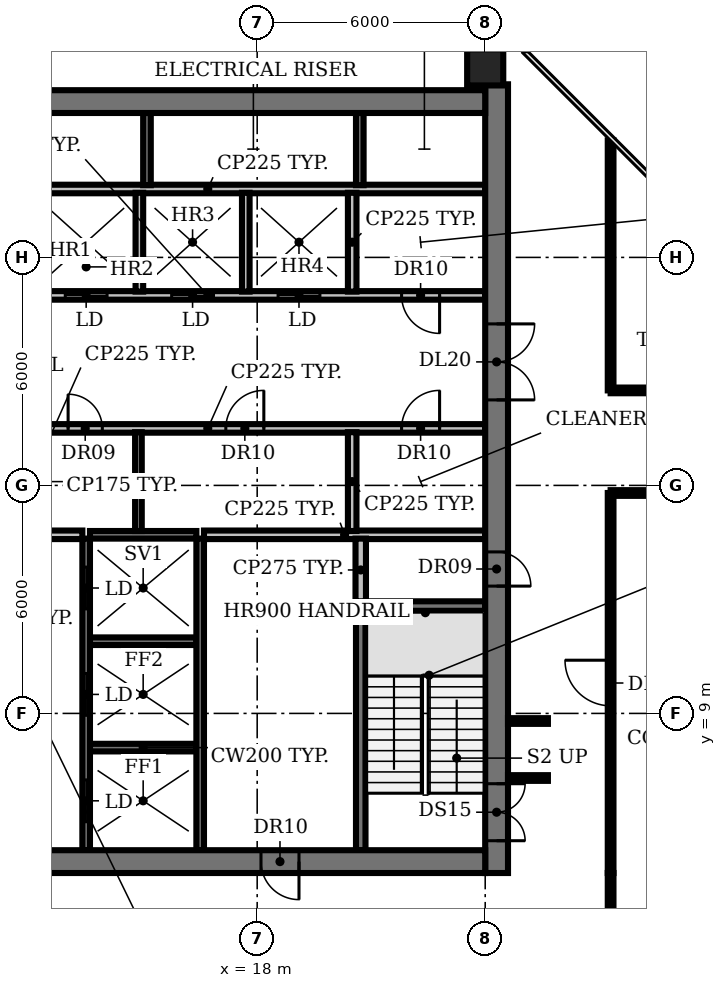
"""IFC4 building model, lengths in metres.
Left out: names, types, materials, properties, quantities, classifications, styles, units other than length and angle.
Written with IfcOpenShell. Run it as: python <this file> out.ifc"""

import sys

from ifc_helpers import new_model, si_unit, direction, frame, frame_2d, origin, origin_2d, place, context, subcontext, project, spatial, rectangle, circle, extrude, element, fill, save


model = new_model("IFC4")
c1 = context("Model", 3, precision=1e-05, world=origin(), true_north=direction((0.0, 1.0)))
c2 = subcontext(c1, "Body", "Model", "MODEL_VIEW")
j1 = project(units=[si_unit("LENGTHUNIT", "METRE"), si_unit("PLANEANGLEUNIT", "RADIAN")], contexts=[c1])
p1 = place(None, origin())
s1 = spatial("IfcSite", under=j1, at=p1, CompositionType="ELEMENT")
p2 = place(p1, origin())
s2 = spatial("IfcBuilding", under=s1, at=p2, CompositionType="ELEMENT")
p3 = place(p2, frame((0.0, 0.0, 155.0)))
s3 = spatial("IfcBuildingStorey", under=s2, at=p3, CompositionType="ELEMENT", Elevation=155.0)
p4 = place(p3, frame((24.0, 26.0, 0.0), z_axis=(0.0, 0.0, 1.0), x_axis=(1.0, 0.0, 0.0)))
e1 = element("IfcColumn", 1, at=p4, inside=s3, PredefinedType="COLUMN", context=c2, shape_type="SweptSolid", body=[
    extrude(circle(Radius=0.475, at=origin_2d()), origin(), (0.0, 0.0, 1.0), 3.85),
])
for number, where, z_axis, x_axis in (
    (2, (13.6, 8.1, 0.0), (0.0, 0.0, 1.0), (1.0, 0.0, 0.0)),
    (3, (13.6, 10.9, 0.0), (0.0, 0.0, 1.0), (1.0, 0.0, 0.0)),
):
    element("IfcWall", number, at=place(p3, frame(where, z_axis=z_axis, x_axis=x_axis)), inside=s3, PredefinedType="SHEAR", context=c2, shape_type="SweptSolid", body=[
        extrude(rectangle(XDim=2.8, YDim=0.2, at=frame_2d((1.4, 0.0))), origin(), (0.0, 0.0, 1.0), 3.85),
    ])
p5 = place(p3, frame((20.85, 11.825, 0.0), z_axis=(0.0, 0.0, 1.0), x_axis=(1.0, 0.0, 0.0)))
e4 = element("IfcWall", 4, at=p5, inside=s3, PredefinedType="SHEAR", context=c2, shape_type="SweptSolid", body=[
    extrude(rectangle(XDim=3.15, YDim=0.25, at=frame_2d((1.575, 0.0))), origin(), (0.0, 0.0, 1.0), 3.85),
])
p6 = place(p3, frame((9.4, 13.7, 0.0), z_axis=(0.0, 0.0, 1.0), x_axis=(1.0, 0.0, 0.0)))
e5 = element("IfcWall", 5, at=p6, inside=s3, PredefinedType="PARTITIONING", context=c2, shape_type="SweptSolid", body=[
    extrude(rectangle(XDim=4.0, YDim=0.225, at=frame_2d((2.0, 0.0))), origin(), (0.0, 0.0, 1.0), 3.85),
])
p7 = place(p3, frame((13.6, 13.7, 0.0), z_axis=(0.0, 0.0, 1.0), x_axis=(1.0, 0.0, 0.0)))
e6 = element("IfcWall", 6, at=p7, inside=s3, PredefinedType="SHEAR", context=c2, shape_type="SweptSolid", body=[
    extrude(rectangle(XDim=2.8, YDim=0.2, at=frame_2d((1.4, 0.0))), origin(), (0.0, 0.0, 1.0), 3.85),
])
p8 = place(p3, frame((16.6, 13.7, 0.0), z_axis=(0.0, 0.0, 1.0), x_axis=(1.0, 0.0, 0.0)))
e7 = element("IfcWall", 7, at=p8, inside=s3, PredefinedType="PARTITIONING", context=c2, shape_type="SweptSolid", body=[
    extrude(rectangle(XDim=7.4, YDim=0.225, at=frame_2d((3.7, 0.0))), origin(), (0.0, 0.0, 1.0), 3.85),
])
p9 = place(p3, frame((9.4, 16.5, 0.0), z_axis=(0.0, 0.0, 1.0), x_axis=(1.0, 0.0, 0.0)))
e8 = element("IfcWall", 8, at=p9, inside=s3, PredefinedType="PARTITIONING", context=c2, shape_type="SweptSolid", body=[
    extrude(rectangle(XDim=14.6, YDim=0.225, at=frame_2d((7.3, 0.0))), origin(), (0.0, 0.0, 1.0), 3.85),
])
p10 = place(p9, frame((0.85, 0.0, 0.0)))
e9 = element("IfcOpeningElement", 9, at=p10, cuts=e8, PredefinedType="OPENING", context=c2, shape_type="SweptSolid", body=[
    extrude(rectangle(XDim=0.9, YDim=2.1, at=frame_2d((0.45, 1.05))), frame((0.0, 0.123, 0.0), z_axis=(0.0, -1.0, 0.0), x_axis=(1.0, 0.0, 0.0)), (0.0, 0.0, 1.0), 0.245),
])
p11 = place(p9, frame((3.625, 0.0, 0.0)))
e10 = element("IfcOpeningElement", 10, at=p11, cuts=e8, PredefinedType="OPENING", context=c2, shape_type="SweptSolid", body=[
    extrude(rectangle(XDim=0.9, YDim=2.1, at=frame_2d((0.45, 1.05))), frame((0.0, 0.123, 0.0), z_axis=(0.0, -1.0, 0.0), x_axis=(1.0, 0.0, 0.0)), (0.0, 0.0, 1.0), 0.245),
])
p12 = place(p9, frame((7.775, 0.0, 0.0)))
e11 = element("IfcOpeningElement", 11, at=p12, cuts=e8, PredefinedType="OPENING", context=c2, shape_type="SweptSolid", body=[
    extrude(rectangle(XDim=1.0, YDim=2.1, at=frame_2d((0.5, 1.05))), frame((0.0, 0.123, 0.0), z_axis=(0.0, -1.0, 0.0), x_axis=(1.0, 0.0, 0.0)), (0.0, 0.0, 1.0), 0.245),
])
p13 = place(p9, frame((12.4, 0.0, 0.0)))
e12 = element("IfcOpeningElement", 12, at=p13, cuts=e8, PredefinedType="OPENING", context=c2, shape_type="SweptSolid", body=[
    extrude(rectangle(XDim=1.0, YDim=2.1, at=frame_2d((0.5, 1.05))), frame((0.0, 0.123, 0.0), z_axis=(0.0, -1.0, 0.0), x_axis=(1.0, 0.0, 0.0)), (0.0, 0.0, 1.0), 0.245),
])
p14 = place(p3, frame((24.0, 20.0, 0.0), z_axis=(0.0, 0.0, 1.0), x_axis=(-1.0, 0.0, 0.0)))
e13 = element("IfcWall", 13, at=p14, inside=s3, PredefinedType="PARTITIONING", context=c2, shape_type="SweptSolid", body=[
    extrude(rectangle(XDim=14.6, YDim=0.225, at=frame_2d((7.3, 0.0))), origin(), (0.0, 0.0, 1.0), 3.85),
])
p15 = place(p14, frame((12.75, 0.0, 0.0)))
e14 = element("IfcOpeningElement", 14, at=p15, cuts=e13, PredefinedType="OPENING", context=c2, shape_type="SweptSolid", body=[
    extrude(rectangle(XDim=1.1, YDim=2.1, at=frame_2d((0.55, 1.05))), frame((0.0, 0.123, 0.0), z_axis=(0.0, -1.0, 0.0), x_axis=(1.0, 0.0, 0.0)), (0.0, 0.0, 1.0), 0.245),
])
p16 = place(p14, frame((9.95, 0.0, 0.0)))
e15 = element("IfcOpeningElement", 15, at=p16, cuts=e13, PredefinedType="OPENING", context=c2, shape_type="SweptSolid", body=[
    extrude(rectangle(XDim=1.1, YDim=2.1, at=frame_2d((0.55, 1.05))), frame((0.0, 0.123, 0.0), z_axis=(0.0, -1.0, 0.0), x_axis=(1.0, 0.0, 0.0)), (0.0, 0.0, 1.0), 0.245),
])
p17 = place(p14, frame((7.15, 0.0, 0.0)))
e16 = element("IfcOpeningElement", 16, at=p17, cuts=e13, PredefinedType="OPENING", context=c2, shape_type="SweptSolid", body=[
    extrude(rectangle(XDim=1.1, YDim=2.1, at=frame_2d((0.55, 1.05))), frame((0.0, 0.123, 0.0), z_axis=(0.0, -1.0, 0.0), x_axis=(1.0, 0.0, 0.0)), (0.0, 0.0, 1.0), 0.245),
])
p18 = place(p14, frame((4.35, 0.0, 0.0)))
e17 = element("IfcOpeningElement", 17, at=p18, cuts=e13, PredefinedType="OPENING", context=c2, shape_type="SweptSolid", body=[
    extrude(rectangle(XDim=1.1, YDim=2.1, at=frame_2d((0.55, 1.05))), frame((0.0, 0.123, 0.0), z_axis=(0.0, -1.0, 0.0), x_axis=(1.0, 0.0, 0.0)), (0.0, 0.0, 1.0), 0.245),
])
p19 = place(p14, frame((1.2, 0.0, 0.0)))
e18 = element("IfcOpeningElement", 18, at=p19, cuts=e13, PredefinedType="OPENING", context=c2, shape_type="SweptSolid", body=[
    extrude(rectangle(XDim=1.0, YDim=2.1, at=frame_2d((0.5, 1.05))), frame((0.0, 0.123, 0.0), z_axis=(0.0, -1.0, 0.0), x_axis=(1.0, 0.0, 0.0)), (0.0, 0.0, 1.0), 0.245),
])
p20 = place(p3, frame((9.4, 22.8, 0.0), z_axis=(0.0, 0.0, 1.0), x_axis=(1.0, 0.0, 0.0)))
e19 = element("IfcWall", 19, at=p20, inside=s3, PredefinedType="PARTITIONING", context=c2, shape_type="SweptSolid", body=[
    extrude(rectangle(XDim=14.6, YDim=0.225, at=frame_2d((7.3, 0.0))), origin(), (0.0, 0.0, 1.0), 3.85),
])
p21 = place(p3, frame((13.5, 5.4, 0.0), z_axis=(0.0, 0.0, 1.0), x_axis=(0.0, 1.0, 0.0)))
e20 = element("IfcWall", 20, at=p21, inside=s3, PredefinedType="SHEAR", context=c2, shape_type="SweptSolid", body=[
    extrude(rectangle(XDim=8.2, YDim=0.2, at=frame_2d((4.1, 0.0))), origin(), (0.0, 0.0, 1.0), 3.85),
])
p22 = place(p21, frame((0.75, 0.0, 0.0)))
e21 = element("IfcOpeningElement", 21, at=p22, cuts=e20, PredefinedType="OPENING", context=c2, shape_type="SweptSolid", body=[
    extrude(rectangle(XDim=1.1, YDim=2.1, at=frame_2d((0.55, 1.05))), frame((0.0, 0.11, 0.0), z_axis=(0.0, -1.0, 0.0), x_axis=(1.0, 0.0, 0.0)), (0.0, 0.0, 1.0), 0.22),
])
p23 = place(p21, frame((3.55, 0.0, 0.0)))
e22 = element("IfcOpeningElement", 22, at=p23, cuts=e20, PredefinedType="OPENING", context=c2, shape_type="SweptSolid", body=[
    extrude(rectangle(XDim=1.1, YDim=2.1, at=frame_2d((0.55, 1.05))), frame((0.0, 0.11, 0.0), z_axis=(0.0, -1.0, 0.0), x_axis=(1.0, 0.0, 0.0)), (0.0, 0.0, 1.0), 0.22),
])
p24 = place(p21, frame((6.35, 0.0, 0.0)))
e23 = element("IfcOpeningElement", 23, at=p24, cuts=e20, PredefinedType="OPENING", context=c2, shape_type="SweptSolid", body=[
    extrude(rectangle(XDim=1.1, YDim=2.1, at=frame_2d((0.55, 1.05))), frame((0.0, 0.11, 0.0), z_axis=(0.0, -1.0, 0.0), x_axis=(1.0, 0.0, 0.0)), (0.0, 0.0, 1.0), 0.22),
])
p25 = place(p3, frame((14.875, 13.8, 0.0), z_axis=(0.0, 0.0, 1.0), x_axis=(0.0, 1.0, 0.0)))
e24 = element("IfcWall", 24, at=p25, inside=s3, PredefinedType="PARTITIONING", context=c2, shape_type="SweptSolid", body=[
    extrude(rectangle(XDim=2.6, YDim=0.175, at=frame_2d((1.3, 0.0))), origin(), (0.0, 0.0, 1.0), 3.85),
])
p26 = place(p3, frame((14.9, 20.1, 0.0), z_axis=(0.0, 0.0, 1.0), x_axis=(0.0, 1.0, 0.0)))
e25 = element("IfcWall", 25, at=p26, inside=s3, PredefinedType="SOLIDWALL", context=c2, shape_type="SweptSolid", body=[
    extrude(rectangle(XDim=2.6, YDim=0.2, at=frame_2d((1.3, 0.0))), origin(), (0.0, 0.0, 1.0), 3.85),
])
p27 = place(p3, frame((15.1, 22.9, 0.0), z_axis=(0.0, 0.0, 1.0), x_axis=(0.0, 1.0, 0.0)))
e26 = element("IfcWall", 26, at=p27, inside=s3, PredefinedType="SHEAR", context=c2, shape_type="SweptSolid", body=[
    extrude(rectangle(XDim=1.9, YDim=0.2, at=frame_2d((0.95, 0.0))), origin(), (0.0, 0.0, 1.0), 3.85),
])
p28 = place(p3, frame((16.5, 5.4, 0.0), z_axis=(0.0, 0.0, 1.0), x_axis=(0.0, 1.0, 0.0)))
e27 = element("IfcWall", 27, at=p28, inside=s3, PredefinedType="SHEAR", context=c2, shape_type="SweptSolid", body=[
    extrude(rectangle(XDim=8.2, YDim=0.2, at=frame_2d((4.1, 0.0))), origin(), (0.0, 0.0, 1.0), 3.85),
])
p29 = place(p3, frame((17.7, 20.1, 0.0), z_axis=(0.0, 0.0, 1.0), x_axis=(0.0, 1.0, 0.0)))
e28 = element("IfcWall", 28, at=p29, inside=s3, PredefinedType="SOLIDWALL", context=c2, shape_type="SweptSolid", body=[
    extrude(rectangle(XDim=2.6, YDim=0.2, at=frame_2d((1.3, 0.0))), origin(), (0.0, 0.0, 1.0), 3.85),
])
for number, where, z_axis, x_axis in (
    (29, (20.5, 13.8, 0.0), (0.0, 0.0, 1.0), (0.0, 1.0, 0.0)),
    (30, (20.5, 20.1, 0.0), (0.0, 0.0, 1.0), (0.0, 1.0, 0.0)),
):
    element("IfcWall", number, at=place(p3, frame(where, z_axis=z_axis, x_axis=x_axis)), inside=s3, PredefinedType="PARTITIONING", context=c2, shape_type="SweptSolid", body=[
        extrude(rectangle(XDim=2.6, YDim=0.225, at=frame_2d((1.3, 0.0))), origin(), (0.0, 0.0, 1.0), 3.85),
    ])
p30 = place(p3, frame((20.7, 22.9, 0.0), z_axis=(0.0, 0.0, 1.0), x_axis=(0.0, 1.0, 0.0)))
e31 = element("IfcWall", 31, at=p30, inside=s3, PredefinedType="SHEAR", context=c2, shape_type="SweptSolid", body=[
    extrude(rectangle(XDim=1.9, YDim=0.2, at=frame_2d((0.95, 0.0))), origin(), (0.0, 0.0, 1.0), 3.85),
])
p31 = place(p3, frame((20.725, 5.4, 0.0), z_axis=(0.0, 0.0, 1.0), x_axis=(0.0, 1.0, 0.0)))
e32 = element("IfcWall", 32, at=p31, inside=s3, PredefinedType="SHEAR", context=c2, shape_type="SweptSolid", body=[
    extrude(rectangle(XDim=6.3, YDim=0.25, at=frame_2d((3.15, 0.0))), origin(), (0.0, 0.0, 1.0), 3.85),
])
p32 = place(p3, frame((20.725, 11.95, 0.0), z_axis=(0.0, 0.0, 1.0), x_axis=(0.0, 1.0, 0.0)))
e33 = element("IfcWall", 33, at=p32, inside=s3, PredefinedType="PARTITIONING", context=c2, shape_type="SweptSolid", body=[
    extrude(rectangle(XDim=1.65, YDim=0.275, at=frame_2d((0.825, 0.0))), origin(), (0.0, 0.0, 1.0), 3.85),
])
p33 = place(p3, frame((24.3, 25.555, 0.0), z_axis=(0.0, 0.0, 1.0), x_axis=(0.0, -1.0, 0.0)))
e34 = element("IfcWall", 34, at=p33, inside=s3, PredefinedType="SHEAR", context=c2, shape_type="SweptSolid", body=[
    extrude(rectangle(XDim=20.755, YDim=0.6, at=frame_2d((10.377, 0.0))), origin(), (0.0, 0.0, 1.0), 3.85),
])
p34 = place(p33, frame((18.405, 0.0, 0.0)))
e35 = element("IfcOpeningElement", 35, at=p34, cuts=e34, PredefinedType="OPENING", context=c2, shape_type="SweptSolid", body=[
    extrude(rectangle(XDim=1.5, YDim=2.1, at=frame_2d((0.75, 1.05))), frame((0.0, 0.31, 0.0), z_axis=(0.0, -1.0, 0.0), x_axis=(1.0, 0.0, 0.0)), (0.0, 0.0, 1.0), 0.62),
])
p35 = place(p33, frame((12.305, 0.0, 0.0)))
e36 = element("IfcOpeningElement", 36, at=p35, cuts=e34, PredefinedType="OPENING", context=c2, shape_type="SweptSolid", body=[
    extrude(rectangle(XDim=0.9, YDim=2.1, at=frame_2d((0.45, 1.05))), frame((0.0, 0.31, 0.0), z_axis=(0.0, -1.0, 0.0), x_axis=(1.0, 0.0, 0.0)), (0.0, 0.0, 1.0), 0.62),
])
p36 = place(p33, frame((6.305, 0.0, 0.0)))
e37 = element("IfcOpeningElement", 37, at=p36, cuts=e34, PredefinedType="OPENING", context=c2, shape_type="SweptSolid", body=[
    extrude(rectangle(XDim=2.0, YDim=2.1, at=frame_2d((1.0, 1.05))), frame((0.0, 0.31, 0.0), z_axis=(0.0, -1.0, 0.0), x_axis=(1.0, 0.0, 0.0)), (0.0, 0.0, 1.0), 0.62),
])
p37 = place(p3, frame((24.0, 5.1, 0.0), z_axis=(0.0, 0.0, 1.0), x_axis=(-1.0, 0.0, 0.0)))
e38 = element("IfcWall", 38, at=p37, inside=s3, PredefinedType="SHEAR", context=c2, shape_type="SweptSolid", body=[
    extrude(rectangle(XDim=18.0, YDim=0.6, at=frame_2d((9.0, 0.0))), origin(), (0.0, 0.0, 1.0), 3.85),
])
p38 = place(p37, frame((13.0, 0.0, 0.0)))
e39 = element("IfcOpeningElement", 39, at=p38, cuts=e38, PredefinedType="OPENING", context=c2, shape_type="SweptSolid", body=[
    extrude(rectangle(XDim=1.2, YDim=2.1, at=frame_2d((0.6, 1.05))), frame((0.0, 0.31, 0.0), z_axis=(0.0, -1.0, 0.0), x_axis=(1.0, 0.0, 0.0)), (0.0, 0.0, 1.0), 0.62),
])
p39 = place(p37, frame((4.9, 0.0, 0.0)))
e40 = element("IfcOpeningElement", 40, at=p39, cuts=e38, PredefinedType="OPENING", context=c2, shape_type="SweptSolid", body=[
    extrude(rectangle(XDim=1.0, YDim=2.1, at=frame_2d((0.5, 1.05))), frame((0.0, 0.31, 0.0), z_axis=(0.0, -1.0, 0.0), x_axis=(1.0, 0.0, 0.0)), (0.0, 0.0, 1.0), 0.62),
])
p40 = place(p3, frame((6.0, 25.1, 0.0), z_axis=(0.0, 0.0, 1.0), x_axis=(1.0, 0.0, 0.0)))
e41 = element("IfcWall", 41, at=p40, inside=s3, PredefinedType="SHEAR", context=c2, shape_type="SweptSolid", body=[
    extrude(rectangle(XDim=18.0, YDim=0.6, at=frame_2d((9.0, 0.0))), origin(), (0.0, 0.0, 1.0), 3.85),
])
for number, where, z_axis, x_axis in (
    (42, (24.6, 7.3, 0.0), (0.0, 0.0, 1.0), (1.0, 0.0, 0.0)),
    (43, (24.6, 8.8, 0.0), (0.0, 0.0, 1.0), (1.0, 0.0, 0.0)),
):
    element("IfcWall", number, at=place(p3, frame(where, z_axis=z_axis, x_axis=x_axis)), inside=s3, PredefinedType="PARTITIONING", context=c2, shape_type="SweptSolid", body=[
        extrude(rectangle(XDim=1.05, YDim=0.15, at=frame_2d((0.525, 0.0))), origin(), (0.0, 0.0, 1.0), 2.88),
    ])
p41 = place(p3, frame((27.3, 0.9, 0.0), z_axis=(0.0, 0.0, 1.0), x_axis=(0.0, 1.0, 0.0)))
e44 = element("IfcWall", 44, at=p41, inside=s3, PredefinedType="PARTITIONING", context=c2, shape_type="SweptSolid", body=[
    extrude(rectangle(XDim=3.9, YDim=0.15, at=frame_2d((1.95, 0.0))), origin(), (0.0, 0.0, 1.0), 2.88),
])
p42 = place(p3, frame((27.3, 4.8, 0.0), z_axis=(0.0, 0.0, 1.0), x_axis=(0.0, 1.0, 0.0)))
e45 = element("IfcWall", 45, at=p42, inside=s3, PredefinedType="PARTITIONING", context=c2, shape_type="SweptSolid", body=[
    extrude(rectangle(XDim=10.0, YDim=0.15, at=frame_2d((5.0, 0.0))), origin(), (0.0, 0.0, 1.0), 2.88),
])
p43 = place(p42, frame((4.4, 0.0, 0.0)))
e46 = element("IfcOpeningElement", 46, at=p43, cuts=e45, PredefinedType="OPENING", context=c2, shape_type="SweptSolid", body=[
    extrude(rectangle(XDim=1.2, YDim=2.1, at=frame_2d((0.6, 1.05))), frame((0.0, 0.085, 0.0), z_axis=(0.0, -1.0, 0.0), x_axis=(1.0, 0.0, 0.0)), (0.0, 0.0, 1.0), 0.17),
])
p44 = place(p3, frame((27.3, 14.8, 0.0), z_axis=(0.0, 0.0, 1.0), x_axis=(1.0, 0.0, 0.0)))
e47 = element("IfcWall", 47, at=p44, inside=s3, PredefinedType="PARTITIONING", context=c2, shape_type="SweptSolid", body=[
    extrude(rectangle(XDim=8.7, YDim=0.15, at=frame_2d((4.35, 0.0))), origin(), (0.0, 0.0, 1.0), 2.88),
])
p45 = place(p3, frame((27.3, 17.5, 0.0), z_axis=(0.0, 0.0, 1.0), x_axis=(0.0, 1.0, 0.0)))
e48 = element("IfcWall", 48, at=p45, inside=s3, PredefinedType="PARTITIONING", context=c2, shape_type="SweptSolid", body=[
    extrude(rectangle(XDim=6.58, YDim=0.15, at=frame_2d((3.29, 0.0))), origin(), (0.0, 0.0, 1.0), 2.88),
])
p46 = place(p3, frame((27.3, 17.5, 0.0), z_axis=(0.0, 0.0, 1.0), x_axis=(1.0, 0.0, 0.0)))
e49 = element("IfcWall", 49, at=p46, inside=s3, PredefinedType="PARTITIONING", context=c2, shape_type="SweptSolid", body=[
    extrude(rectangle(XDim=12.58, YDim=0.15, at=frame_2d((6.29, 0.0))), origin(), (0.0, 0.0, 1.0), 2.88),
])
p47 = place(p46, frame((5.68, 0.0, 0.0)))
e50 = element("IfcOpeningElement", 50, at=p47, cuts=e49, PredefinedType="OPENING", context=c2, shape_type="SweptSolid", body=[
    extrude(rectangle(XDim=1.0, YDim=2.1, at=frame_2d((0.5, 1.05))), frame((0.0, 0.085, 0.0), z_axis=(0.0, -1.0, 0.0), x_axis=(1.0, 0.0, 0.0)), (0.0, 0.0, 1.0), 0.17),
])
p48 = place(p11, origin())
e51 = element("IfcDoor", 51, at=p48, inside=s3, OperationType="SINGLE_SWING_LEFT", PredefinedType="DOOR", context=c2, shape_type="SweptSolid", body=[
    extrude(rectangle(XDim=0.9, YDim=2.1, at=frame_2d((0.45, 1.05))), frame((0.0, 0.025, 0.0), z_axis=(0.0, -1.0, 0.0), x_axis=(1.0, 0.0, 0.0)), (0.0, 0.0, 1.0), 0.05),
])
fill(e10, e51)
p49 = place(p12, origin())
e52 = element("IfcDoor", 52, at=p49, inside=s3, OperationType="SINGLE_SWING_RIGHT", PredefinedType="DOOR", context=c2, shape_type="SweptSolid", body=[
    extrude(rectangle(XDim=1.0, YDim=2.1, at=frame_2d((0.5, 1.05))), frame((0.0, 0.025, 0.0), z_axis=(0.0, -1.0, 0.0), x_axis=(1.0, 0.0, 0.0)), (0.0, 0.0, 1.0), 0.05),
])
fill(e11, e52)
p50 = place(p13, origin())
e53 = element("IfcDoor", 53, at=p50, inside=s3, OperationType="SINGLE_SWING_RIGHT", PredefinedType="DOOR", context=c2, shape_type="SweptSolid", body=[
    extrude(rectangle(XDim=1.0, YDim=2.1, at=frame_2d((0.5, 1.05))), frame((0.0, 0.025, 0.0), z_axis=(0.0, -1.0, 0.0), x_axis=(1.0, 0.0, 0.0)), (0.0, 0.0, 1.0), 0.05),
])
fill(e12, e53)
p51 = place(p16, origin())
e54 = element("IfcDoor", 54, at=p51, inside=s3, OperationType="DOUBLE_DOOR_SLIDING", PredefinedType="DOOR", context=c2, shape_type="SweptSolid", body=[
    extrude(rectangle(XDim=1.1, YDim=2.1, at=frame_2d((0.55, 1.05))), frame((0.0, 0.025, 0.0), z_axis=(0.0, -1.0, 0.0), x_axis=(1.0, 0.0, 0.0)), (0.0, 0.0, 1.0), 0.05),
])
fill(e15, e54)
p52 = place(p17, origin())
e55 = element("IfcDoor", 55, at=p52, inside=s3, OperationType="DOUBLE_DOOR_SLIDING", PredefinedType="DOOR", context=c2, shape_type="SweptSolid", body=[
    extrude(rectangle(XDim=1.1, YDim=2.1, at=frame_2d((0.55, 1.05))), frame((0.0, 0.025, 0.0), z_axis=(0.0, -1.0, 0.0), x_axis=(1.0, 0.0, 0.0)), (0.0, 0.0, 1.0), 0.05),
])
fill(e16, e55)
p53 = place(p18, origin())
e56 = element("IfcDoor", 56, at=p53, inside=s3, OperationType="DOUBLE_DOOR_SLIDING", PredefinedType="DOOR", context=c2, shape_type="SweptSolid", body=[
    extrude(rectangle(XDim=1.1, YDim=2.1, at=frame_2d((0.55, 1.05))), frame((0.0, 0.025, 0.0), z_axis=(0.0, -1.0, 0.0), x_axis=(1.0, 0.0, 0.0)), (0.0, 0.0, 1.0), 0.05),
])
fill(e17, e56)
p54 = place(p19, origin())
e57 = element("IfcDoor", 57, at=p54, inside=s3, OperationType="SINGLE_SWING_LEFT", PredefinedType="DOOR", context=c2, shape_type="SweptSolid", body=[
    extrude(rectangle(XDim=1.0, YDim=2.1, at=frame_2d((0.5, 1.05))), frame((0.0, 0.025, 0.0), z_axis=(0.0, -1.0, 0.0), x_axis=(1.0, 0.0, 0.0)), (0.0, 0.0, 1.0), 0.05),
])
fill(e18, e57)
p55 = place(p22, origin())
e58 = element("IfcDoor", 58, at=p55, inside=s3, OperationType="DOUBLE_DOOR_SLIDING", PredefinedType="DOOR", context=c2, shape_type="SweptSolid", body=[
    extrude(rectangle(XDim=1.1, YDim=2.1, at=frame_2d((0.55, 1.05))), frame((0.0, 0.025, 0.0), z_axis=(0.0, -1.0, 0.0), x_axis=(1.0, 0.0, 0.0)), (0.0, 0.0, 1.0), 0.05),
])
fill(e21, e58)
p56 = place(p23, origin())
e59 = element("IfcDoor", 59, at=p56, inside=s3, OperationType="DOUBLE_DOOR_SLIDING", PredefinedType="DOOR", context=c2, shape_type="SweptSolid", body=[
    extrude(rectangle(XDim=1.1, YDim=2.1, at=frame_2d((0.55, 1.05))), frame((0.0, 0.025, 0.0), z_axis=(0.0, -1.0, 0.0), x_axis=(1.0, 0.0, 0.0)), (0.0, 0.0, 1.0), 0.05),
])
fill(e22, e59)
p57 = place(p24, origin())
e60 = element("IfcDoor", 60, at=p57, inside=s3, OperationType="DOUBLE_DOOR_SLIDING", PredefinedType="DOOR", context=c2, shape_type="SweptSolid", body=[
    extrude(rectangle(XDim=1.1, YDim=2.1, at=frame_2d((0.55, 1.05))), frame((0.0, 0.025, 0.0), z_axis=(0.0, -1.0, 0.0), x_axis=(1.0, 0.0, 0.0)), (0.0, 0.0, 1.0), 0.05),
])
fill(e23, e60)
p58 = place(p34, origin())
e61 = element("IfcDoor", 61, at=p58, inside=s3, OperationType="DOUBLE_DOOR_SINGLE_SWING", PredefinedType="DOOR", context=c2, shape_type="SweptSolid", body=[
    extrude(rectangle(XDim=1.5, YDim=2.1, at=frame_2d((0.75, 1.05))), frame((0.0, 0.025, 0.0), z_axis=(0.0, -1.0, 0.0), x_axis=(1.0, 0.0, 0.0)), (0.0, 0.0, 1.0), 0.05),
])
fill(e35, e61)
p59 = place(p35, origin())
e62 = element("IfcDoor", 62, at=p59, inside=s3, OperationType="SINGLE_SWING_RIGHT", PredefinedType="DOOR", context=c2, shape_type="SweptSolid", body=[
    extrude(rectangle(XDim=0.9, YDim=2.1, at=frame_2d((0.45, 1.05))), frame((0.0, -0.24, 0.0), z_axis=(0.0, -1.0, 0.0), x_axis=(1.0, 0.0, 0.0)), (0.0, 0.0, 1.0), 0.05),
])
fill(e36, e62)
p60 = place(p36, origin())
e63 = element("IfcDoor", 63, at=p60, inside=s3, OperationType="DOUBLE_DOOR_SINGLE_SWING", PredefinedType="DOOR", context=c2, shape_type="SweptSolid", body=[
    extrude(rectangle(XDim=2.0, YDim=2.1, at=frame_2d((1.0, 1.05))), frame((0.0, 0.025, 0.0), z_axis=(0.0, -1.0, 0.0), x_axis=(1.0, 0.0, 0.0)), (0.0, 0.0, 1.0), 0.05),
])
fill(e37, e63)
p61 = place(p39, origin())
e64 = element("IfcDoor", 64, at=p61, inside=s3, OperationType="SINGLE_SWING_LEFT", PredefinedType="DOOR", context=c2, shape_type="SweptSolid", body=[
    extrude(rectangle(XDim=1.0, YDim=2.1, at=frame_2d((0.5, 1.05))), frame((0.0, -0.24, 0.0), z_axis=(0.0, -1.0, 0.0), x_axis=(1.0, 0.0, 0.0)), (0.0, 0.0, 1.0), 0.05),
])
fill(e40, e64)
p62 = place(p43, origin())
e65 = element("IfcDoor", 65, at=p62, inside=s3, OperationType="SINGLE_SWING_RIGHT", PredefinedType="DOOR", context=c2, shape_type="SweptSolid", body=[
    extrude(rectangle(XDim=1.2, YDim=2.1, at=frame_2d((0.6, 1.05))), frame((0.0, 0.025, 0.0), z_axis=(0.0, -1.0, 0.0), x_axis=(1.0, 0.0, 0.0)), (0.0, 0.0, 1.0), 0.05),
])
fill(e46, e65)
save(model, sys.argv[1])
